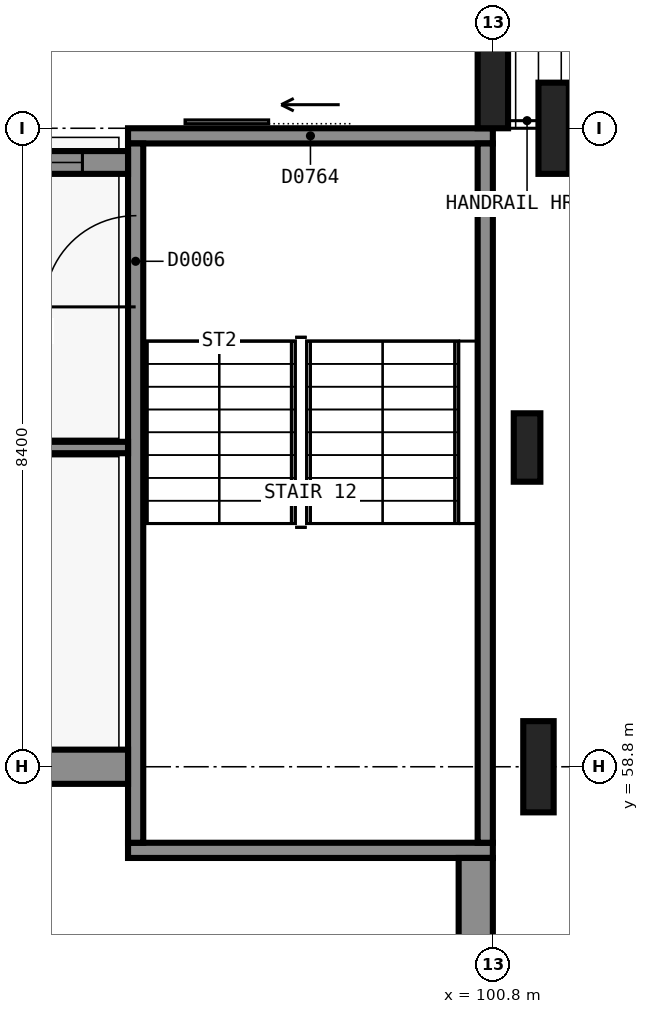
"""IFC4 building model, lengths in metres.
Left out: names, types, materials, properties, quantities, classifications, styles, units other than length and angle.
Written with IfcOpenShell. Run it as: python <this file> out.ifc"""

import sys

from ifc_helpers import new_model, si_unit, direction, frame, frame_2d, origin, origin_2d, place, context, subcontext, project, spatial, rectangle, extrude, element, fill, save


model = new_model("IFC4")
c1 = context("Model", 3, precision=1e-05, world=origin(), true_north=direction((0.0, 1.0)))
c2 = subcontext(c1, "Body", "Model", "MODEL_VIEW")
j1 = project(units=[si_unit("LENGTHUNIT", "METRE"), si_unit("PLANEANGLEUNIT", "RADIAN")], contexts=[c1])
p1 = place(None, origin())
s1 = spatial("IfcSite", under=j1, at=p1, CompositionType="ELEMENT")
p2 = place(p1, origin())
s2 = spatial("IfcBuilding", under=s1, at=p2, CompositionType="ELEMENT")
p3 = place(p2, origin())
s3 = spatial("IfcBuildingStorey", under=s2, at=p3, CompositionType="ELEMENT", Elevation=0.0)
p4 = place(p3, frame((100.8, 57.7, -0.3), z_axis=(0.0, 0.0, 1.0), x_axis=(-1.0, 0.0, 0.0)))
e1 = element("IfcWall", 1, at=p4, inside=s3, PredefinedType="SHEAR", context=c2, shape_type="SweptSolid", body=[
    extrude(rectangle(XDim=4.8, YDim=0.2, at=frame_2d((2.4, 0.0))), origin(), (0.0, 0.0, 1.0), 5.7),
])
p5 = place(p3, frame((96.0, 67.1, -0.3), z_axis=(0.0, 0.0, 1.0), x_axis=(1.0, 0.0, 0.0)))
e2 = element("IfcWall", 2, at=p5, inside=s3, PredefinedType="SHEAR", context=c2, shape_type="SweptSolid", body=[
    extrude(rectangle(XDim=4.8, YDim=0.2, at=frame_2d((2.4, 0.0))), origin(), (0.0, 0.0, 1.0), 5.7),
])
p6 = place(p5, frame((1.85, 0.0, 0.0)))
e3 = element("IfcOpeningElement", 3, at=p6, cuts=e2, PredefinedType="OPENING", context=c2, shape_type="SweptSolid", body=[
    extrude(rectangle(XDim=1.1, YDim=2.2, at=frame_2d((0.55, 1.1))), frame((0.0, 0.11, 0.0), z_axis=(0.0, -1.0, 0.0), x_axis=(1.0, 0.0, 0.0)), (0.0, 0.0, 1.0), 0.22),
])
p7 = place(p3, frame((96.1, 57.8, -0.3), z_axis=(0.0, 0.0, 1.0), x_axis=(0.0, 1.0, 0.0)))
e4 = element("IfcWall", 4, at=p7, inside=s3, PredefinedType="SHEAR", context=c2, shape_type="SweptSolid", body=[
    extrude(rectangle(XDim=9.2, YDim=0.2, at=frame_2d((4.6, 0.0))), origin(), (0.0, 0.0, 1.0), 5.7),
])
p8 = place(p7, frame((7.05, 0.0, 0.3)))
e5 = element("IfcOpeningElement", 5, at=p8, cuts=e4, PredefinedType="OPENING", context=c2, shape_type="SweptSolid", body=[
    extrude(rectangle(XDim=1.2, YDim=2.1, at=frame_2d((0.6, 1.05))), frame((0.0, 0.11, 0.0), z_axis=(0.0, -1.0, 0.0), x_axis=(1.0, 0.0, 0.0)), (0.0, 0.0, 1.0), 0.22),
])
p9 = place(p3, frame((100.7, 67.0, -0.3), z_axis=(0.0, 0.0, 1.0), x_axis=(0.0, -1.0, 0.0)))
e6 = element("IfcWall", 6, at=p9, inside=s3, PredefinedType="SHEAR", context=c2, shape_type="SweptSolid", body=[
    extrude(rectangle(XDim=9.2, YDim=0.2, at=frame_2d((4.6, 0.0))), origin(), (0.0, 0.0, 1.0), 5.7),
])
p10 = place(p3, frame((84.225, 58.8, -0.3), z_axis=(0.0, 0.0, 1.0), x_axis=(1.0, 0.0, 0.0)))
e7 = element("IfcWall", 7, at=p10, inside=s3, PredefinedType="SHEAR", context=c2, shape_type="SweptSolid", body=[
    extrude(rectangle(XDim=11.775, YDim=0.45, at=frame_2d((5.887, 0.0))), origin(), (0.0, 0.0, 1.0), 5.7),
])
p11 = place(p10, frame((4.875, 0.0, 0.3)))
e8 = element("IfcOpeningElement", 8, at=p11, cuts=e7, PredefinedType="OPENING", context=c2, shape_type="SweptSolid", body=[
    extrude(rectangle(XDim=1.8, YDim=2.1, at=frame_2d((0.9, 1.05))), frame((0.0, 0.235, 0.0), z_axis=(0.0, -1.0, 0.0), x_axis=(1.0, 0.0, 0.0)), (0.0, 0.0, 1.0), 0.47),
])
p12 = place(p3, frame((100.575, 57.6, -0.3), z_axis=(0.0, 0.0, 1.0), x_axis=(0.0, -1.0, 0.0)))
e9 = element("IfcWall", 9, at=p12, inside=s3, PredefinedType="SHEAR", context=c2, shape_type="SweptSolid", body=[
    extrude(rectangle(XDim=22.8, YDim=0.45, at=frame_2d((11.4, 0.0))), origin(), (0.0, 0.0, 1.0), 5.7),
])
p13 = place(p3, frame((101.4, 58.8, -0.3), z_axis=(0.0, 0.0, 1.0), x_axis=(0.0, 1.0, 0.0)))
e10 = element("IfcColumn", 10, at=p13, inside=s3, PredefinedType="PILASTER", context=c2, shape_type="SweptSolid", body=[
    extrude(rectangle(XDim=0.4, YDim=1.2, at=origin_2d()), origin(), (0.0, 0.0, 1.0), 5.7),
])
p14 = place(p3, frame((101.25, 63.0, -0.3), z_axis=(0.0, 0.0, 1.0), x_axis=(0.0, 1.0, 0.0)))
e11 = element("IfcColumn", 11, at=p14, inside=s3, PredefinedType="PILASTER", context=c2, shape_type="SweptSolid", body=[
    extrude(rectangle(XDim=0.35, YDim=0.9, at=origin_2d()), origin(), (0.0, 0.0, 1.0), 5.7),
])
p15 = place(p3, frame((101.6, 67.2, -0.3), z_axis=(0.0, 0.0, 1.0), x_axis=(0.0, 1.0, 0.0)))
e12 = element("IfcColumn", 12, at=p15, inside=s3, PredefinedType="PILASTER", context=c2, shape_type="SweptSolid", body=[
    extrude(rectangle(XDim=0.4, YDim=1.2, at=origin_2d()), origin(), (0.0, 0.0, 1.0), 5.7),
])
p16 = place(p3, frame((63.6, 66.75, 0.0), z_axis=(0.0, 0.0, 1.0), x_axis=(1.0, 0.0, 0.0)))
e13 = element("IfcWall", 13, at=p16, inside=s3, PredefinedType="SOLIDWALL", context=c2, shape_type="SweptSolid", body=[
    extrude(rectangle(XDim=32.4, YDim=0.3, at=frame_2d((16.2, 0.0))), origin(), (0.0, 0.0, 1.0), 5.1),
])
p17 = place(p16, frame((14.4, 0.0, 0.0)))
e14 = element("IfcOpeningElement", 14, at=p17, cuts=e13, PredefinedType="OPENING", context=c2, shape_type="SweptSolid", body=[
    extrude(rectangle(XDim=3.6, YDim=3.0, at=frame_2d((1.8, 1.5))), frame((0.0, 0.16, 0.0), z_axis=(0.0, -1.0, 0.0), x_axis=(1.0, 0.0, 0.0)), (0.0, 0.0, 1.0), 0.32),
])
p18 = place(p16, frame((22.8, 0.0, 0.0)))
e15 = element("IfcOpeningElement", 15, at=p18, cuts=e13, PredefinedType="OPENING", context=c2, shape_type="SweptSolid", body=[
    extrude(rectangle(XDim=3.6, YDim=3.0, at=frame_2d((1.8, 1.5))), frame((0.0, 0.16, 0.0), z_axis=(0.0, -1.0, 0.0), x_axis=(1.0, 0.0, 0.0)), (0.0, 0.0, 1.0), 0.32),
])
p19 = place(p16, frame((0.6, 0.0, 0.9)))
e16 = element("IfcOpeningElement", 16, at=p19, cuts=e13, PredefinedType="OPENING", context=c2, shape_type="SweptSolid", body=[
    extrude(rectangle(XDim=1.8, YDim=1.5, at=frame_2d((0.9, 0.75))), frame((0.0, 0.16, 0.0), z_axis=(0.0, -1.0, 0.0), x_axis=(1.0, 0.0, 0.0)), (0.0, 0.0, 1.0), 0.32),
])
p20 = place(p16, frame((5.1, 0.0, 0.9)))
e17 = element("IfcOpeningElement", 17, at=p20, cuts=e13, PredefinedType="OPENING", context=c2, shape_type="SweptSolid", body=[
    extrude(rectangle(XDim=1.2, YDim=1.8, at=frame_2d((0.6, 0.9))), frame((0.0, 0.16, 0.0), z_axis=(0.0, -1.0, 0.0), x_axis=(1.0, 0.0, 0.0)), (0.0, 0.0, 1.0), 0.32),
])
p21 = place(p16, frame((9.3, 0.0, 0.9)))
e18 = element("IfcOpeningElement", 18, at=p21, cuts=e13, PredefinedType="OPENING", context=c2, shape_type="SweptSolid", body=[
    extrude(rectangle(XDim=1.2, YDim=1.8, at=frame_2d((0.6, 0.9))), frame((0.0, 0.16, 0.0), z_axis=(0.0, -1.0, 0.0), x_axis=(1.0, 0.0, 0.0)), (0.0, 0.0, 1.0), 0.32),
])
p22 = place(p16, frame((30.0, 0.0, 0.9)))
e19 = element("IfcOpeningElement", 19, at=p22, cuts=e13, PredefinedType="OPENING", context=c2, shape_type="SweptSolid", body=[
    extrude(rectangle(XDim=1.8, YDim=1.5, at=frame_2d((0.9, 0.75))), frame((0.0, 0.16, 0.0), z_axis=(0.0, -1.0, 0.0), x_axis=(1.0, 0.0, 0.0)), (0.0, 0.0, 1.0), 0.32),
])
p23 = place(p3, frame((100.8, 67.8, -0.3), z_axis=(0.0, 0.0, 1.0), x_axis=(1.0, 0.0, 0.0)))
e20 = element("IfcColumn", 20, at=p23, inside=s3, PredefinedType="PILASTER", context=c2, shape_type="SweptSolid", body=[
    extrude(rectangle(XDim=0.4, YDim=1.2, at=origin_2d()), origin(), (0.0, 0.0, 1.0), 5.7),
])
p24 = place(p3, frame((75.7, 63.0, 0.0), z_axis=(0.0, 0.0, 1.0), x_axis=(1.0, 0.0, 0.0)))
e21 = element("IfcWall", 21, at=p24, inside=s3, PredefinedType="PARTITIONING", context=c2, shape_type="SweptSolid", body=[
    extrude(rectangle(XDim=20.3, YDim=0.15, at=frame_2d((10.15, 0.0))), origin(), (0.0, 0.0, 1.0), 4.4),
])
p25 = place(p24, frame((3.6, 0.0, 0.0)))
e22 = element("IfcOpeningElement", 22, at=p25, cuts=e21, PredefinedType="OPENING", context=c2, shape_type="SweptSolid", body=[
    extrude(rectangle(XDim=1.0, YDim=2.1, at=frame_2d((0.5, 1.05))), frame((0.0, 0.085, 0.0), z_axis=(0.0, -1.0, 0.0), x_axis=(1.0, 0.0, 0.0)), (0.0, 0.0, 1.0), 0.17),
])
p26 = place(p6, origin())
e23 = element("IfcDoor", 23, at=p26, inside=s3, OperationType="SLIDING_TO_LEFT", PredefinedType="DOOR", context=c2, shape_type="SweptSolid", body=[
    extrude(rectangle(XDim=1.1, YDim=2.2, at=frame_2d((0.55, 1.1))), frame((0.0, 0.025, 0.0), z_axis=(0.0, -1.0, 0.0), x_axis=(1.0, 0.0, 0.0)), (0.0, 0.0, 1.0), 0.05),
])
fill(e3, e23)
p27 = place(p22, origin())
e24 = element("IfcWindow", 24, at=p27, inside=s3, PartitioningType="SINGLE_PANEL", PredefinedType="WINDOW", context=c2, shape_type="SweptSolid", body=[
    extrude(rectangle(XDim=1.8, YDim=1.5, at=frame_2d((0.9, 0.75))), frame((0.0, 0.03, 0.0), z_axis=(0.0, -1.0, 0.0), x_axis=(1.0, 0.0, 0.0)), (0.0, 0.0, 1.0), 0.06),
])
fill(e19, e24)
p28 = place(p8, origin())
e25 = element("IfcDoor", 25, at=p28, inside=s3, OperationType="SINGLE_SWING_RIGHT", PredefinedType="DOOR", context=c2, shape_type="SweptSolid", body=[
    extrude(rectangle(XDim=1.2, YDim=2.1, at=frame_2d((0.6, 1.05))), frame((0.0, 0.025, 0.0), z_axis=(0.0, -1.0, 0.0), x_axis=(1.0, 0.0, 0.0)), (0.0, 0.0, 1.0), 0.05),
])
fill(e5, e25)
save(model, sys.argv[1])
